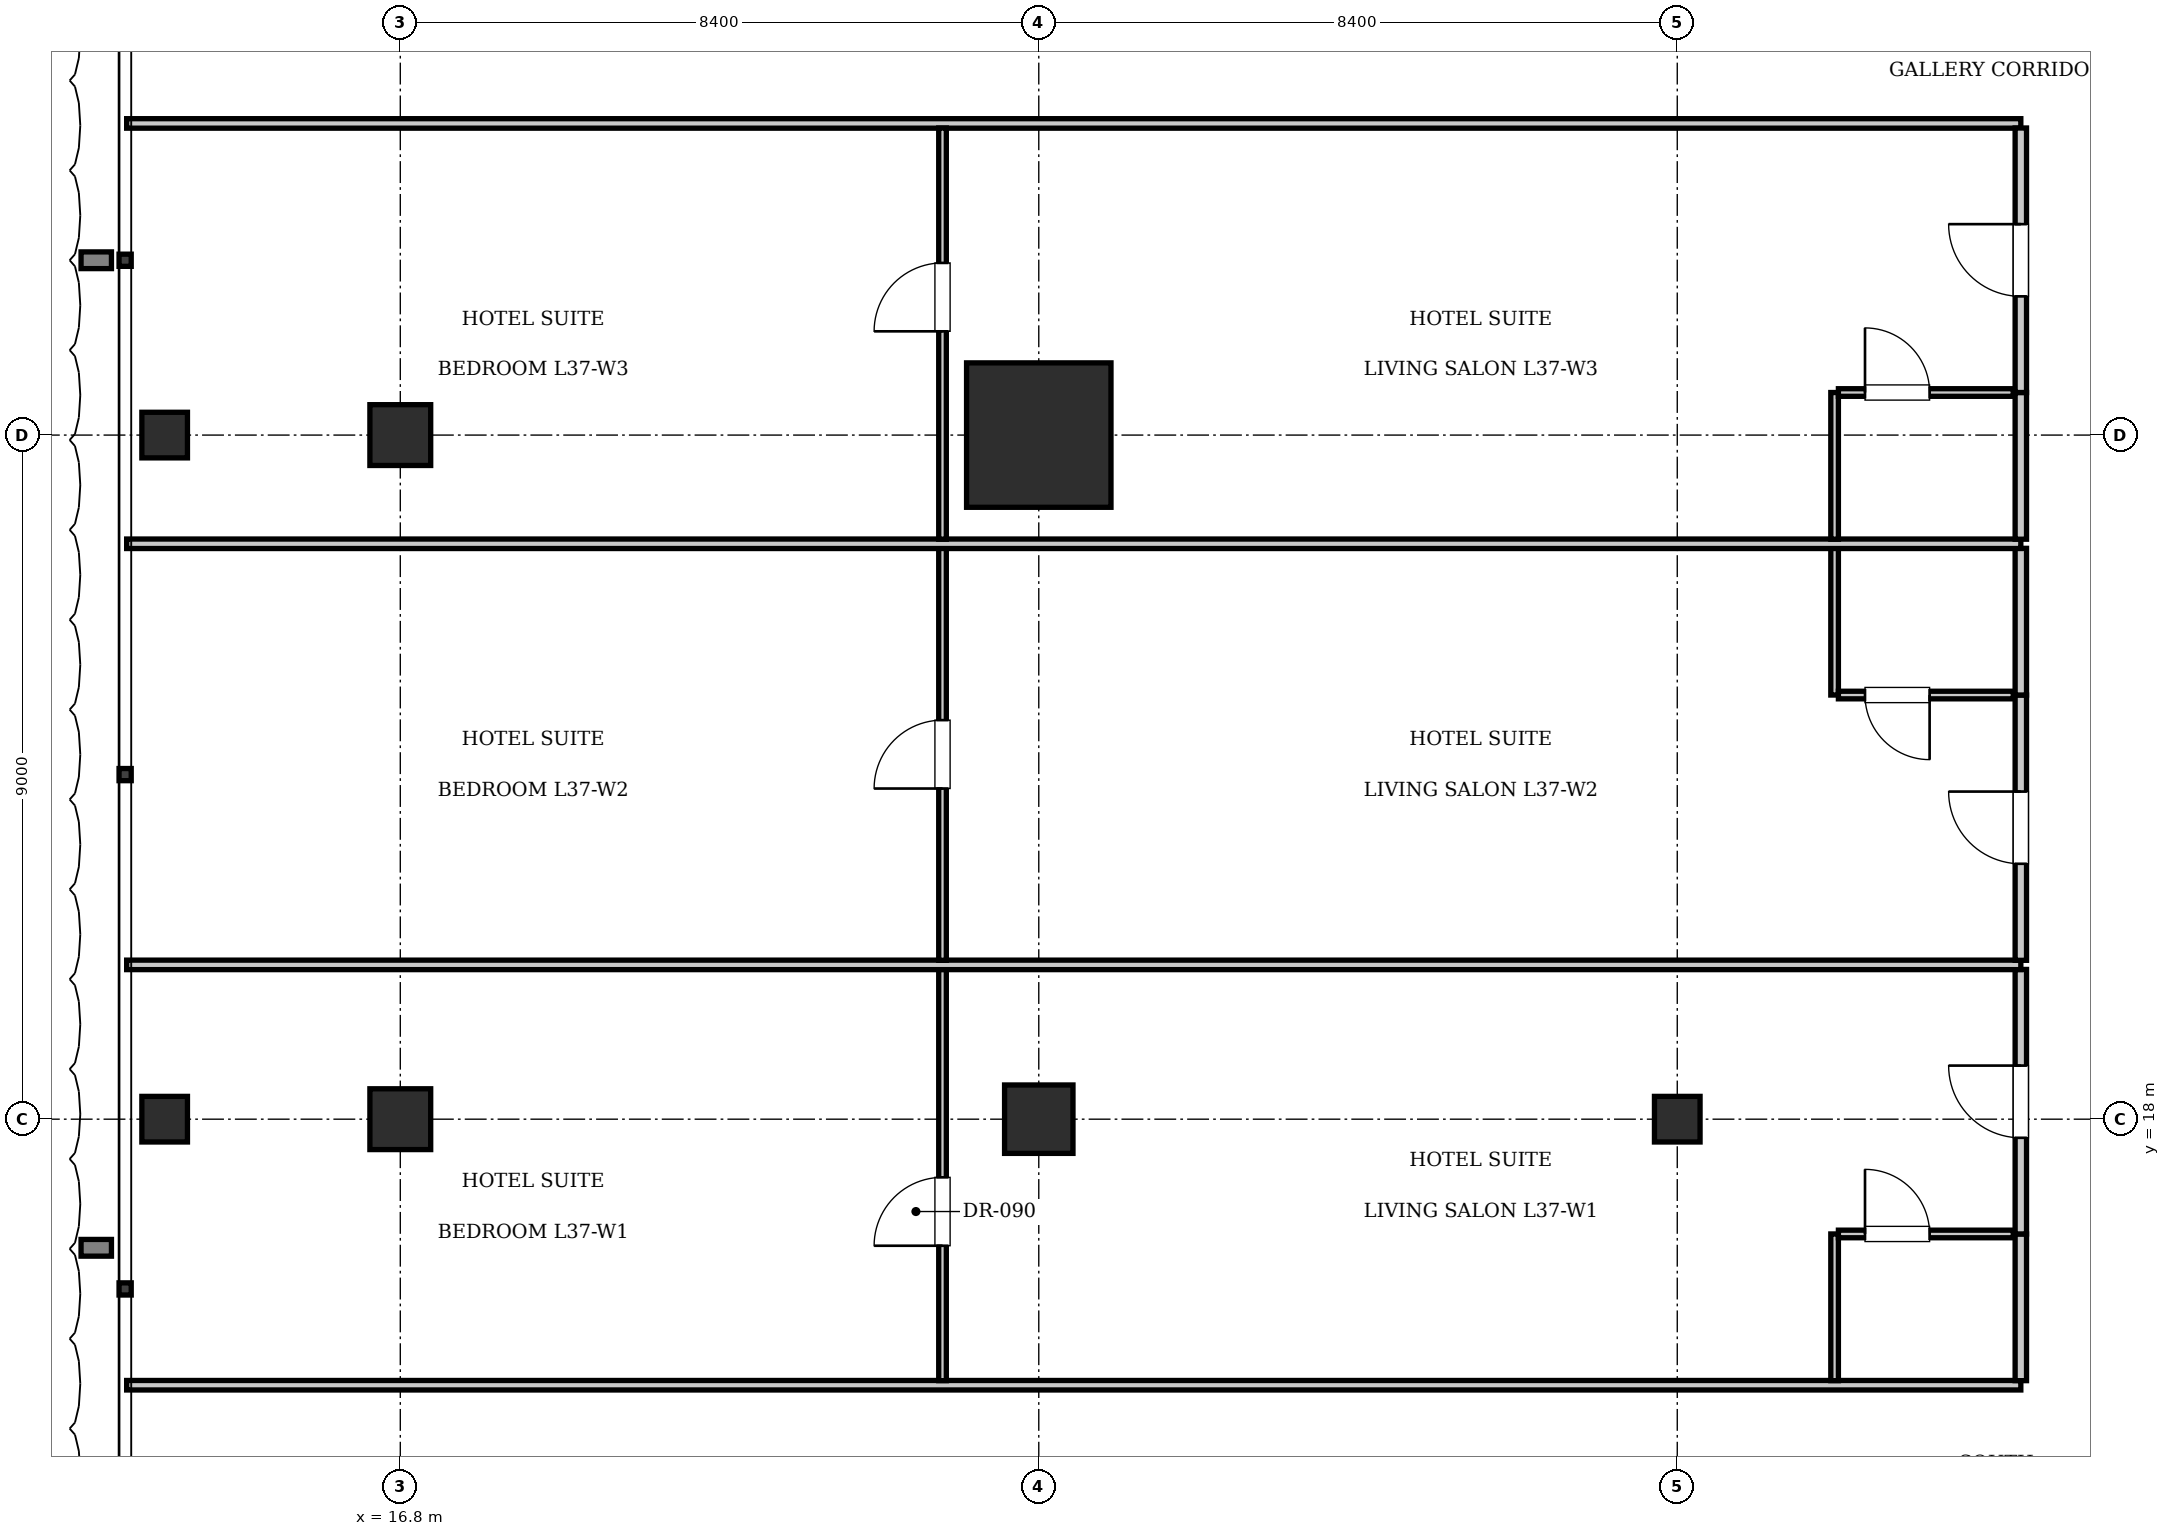
"""IFC4 building model, lengths in metres.
Left out: names, types, materials, properties, quantities, classifications, styles, units other than length and angle.
Written with IfcOpenShell. Run it as: python <this file> out.ifc"""

import sys

from ifc_helpers import new_model, si_unit, direction, frame, frame_2d, origin, origin_2d, place, context, subcontext, project, spatial, rectangle, i_section, extrude, element, fill, save


model = new_model("IFC4")
c1 = context("Model", 3, precision=1e-05, world=origin(), true_north=direction((0.0, 1.0)))
c2 = subcontext(c1, "Body", "Model", "MODEL_VIEW")
j1 = project(units=[si_unit("LENGTHUNIT", "METRE"), si_unit("PLANEANGLEUNIT", "RADIAN")], contexts=[c1])
p1 = place(None, origin())
s1 = spatial("IfcSite", under=j1, at=p1, CompositionType="ELEMENT")
p2 = place(p1, origin())
s2 = spatial("IfcBuilding", under=s1, at=p2, CompositionType="ELEMENT")
p3 = place(p2, frame((0.0, 0.0, 154.35)))
s3 = spatial("IfcBuildingStorey", under=s2, at=p3, CompositionType="ELEMENT", Elevation=154.35)
p4 = place(p3, frame((25.2, 27.0, 0.0), z_axis=(0.0, 0.0, 1.0), x_axis=(1.0, 0.0, 0.0)))
e1 = element("IfcColumn", 1, at=p4, inside=s3, PredefinedType="COLUMN", context=c2, shape_type="SweptSolid", body=[
    extrude(rectangle(XDim=1.9, YDim=1.9, at=origin_2d()), origin(), (0.0, 0.0, 1.0), 3.85),
])
p5 = place(p3, frame((25.2, 18.0, 0.0), z_axis=(0.0, 0.0, 1.0), x_axis=(1.0, 0.0, 0.0)))
e2 = element("IfcColumn", 2, at=p5, inside=s3, PredefinedType="COLUMN", context=c2, shape_type="SweptSolid", body=[
    extrude(rectangle(XDim=0.9, YDim=0.9, at=origin_2d()), origin(), (0.0, 0.0, 1.0), 3.85),
])
p6 = place(p3, frame((33.6, 18.0, 0.0), z_axis=(0.0, 0.0, 1.0), x_axis=(1.0, 0.0, 0.0)))
e3 = element("IfcColumn", 3, at=p6, inside=s3, PredefinedType="COLUMN", context=c2, shape_type="SweptSolid", body=[
    extrude(i_section(OverallWidth=0.6, OverallDepth=0.6, WebThickness=0.025, FlangeThickness=0.038, at=origin_2d()), origin(), (0.0, 0.0, 1.0), 3.85),
])
for number, where, z_axis, x_axis in (
    (4, (16.8, 18.0, 0.0), (0.0, 0.0, 1.0), (1.0, 0.0, 0.0)),
    (5, (16.8, 27.0, 0.0), (0.0, 0.0, 1.0), (1.0, 0.0, 0.0)),
):
    element("IfcColumn", number, at=place(p3, frame(where, z_axis=z_axis, x_axis=x_axis)), inside=s3, PredefinedType="COLUMN", context=c2, shape_type="SweptSolid", body=[
        extrude(rectangle(XDim=0.8, YDim=0.8, at=origin_2d()), origin(), (0.0, 0.0, 1.0), 3.85),
    ])
for number, where, z_axis, x_axis in (
    (6, (13.7, 18.0, 0.0), (0.0, 0.0, 1.0), (1.0, 0.0, 0.0)),
    (7, (13.7, 27.0, 0.0), (0.0, 0.0, 1.0), (1.0, 0.0, 0.0)),
):
    element("IfcColumn", number, at=place(p3, frame(where, z_axis=z_axis, x_axis=x_axis)), inside=s3, PredefinedType="COLUMN", context=c2, shape_type="SweptSolid", body=[
        extrude(i_section(OverallWidth=0.6, OverallDepth=0.6, WebThickness=0.025, FlangeThickness=0.038, at=origin_2d()), origin(), (0.0, 0.0, 1.0), 3.85),
    ])
for number, where, z_axis, x_axis in (
    (8, (13.2, 14.5, 0.0), (0.0, 0.0, 1.0), (1.0, 0.0, 0.0)),
    (9, (13.2, 31.1, 0.0), (0.0, 0.0, 1.0), (1.0, 0.0, 0.0)),
):
    element("IfcWall", number, at=place(p3, frame(where, z_axis=z_axis, x_axis=x_axis)), inside=s3, PredefinedType="PARTITIONING", context=c2, shape_type="SweptSolid", body=[
        extrude(rectangle(XDim=24.92, YDim=0.125, at=frame_2d((12.46, 0.0))), origin(), (0.0, 0.0, 1.0), 3.61),
    ])
p7 = place(p3, frame((38.12, 14.56, 0.0), z_axis=(0.0, 0.0, 1.0), x_axis=(0.0, 1.0, 0.0)))
e10 = element("IfcWall", 10, at=p7, inside=s3, PredefinedType="PARTITIONING", context=c2, shape_type="SweptSolid", body=[
    extrude(rectangle(XDim=1.93, YDim=0.15, at=frame_2d((0.965, 0.0))), origin(), (0.0, 0.0, 1.0), 3.61),
])
p8 = place(p3, frame((38.12, 16.49, 0.0), z_axis=(0.0, 0.0, 1.0), x_axis=(0.0, 1.0, 0.0)))
e11 = element("IfcWall", 11, at=p8, inside=s3, PredefinedType="PARTITIONING", context=c2, shape_type="SweptSolid", body=[
    extrude(rectangle(XDim=3.48, YDim=0.15, at=frame_2d((1.74, 0.0))), origin(), (0.0, 0.0, 1.0), 3.61),
])
p9 = place(p8, frame((1.265, 0.0, 0.0)))
e12 = element("IfcOpeningElement", 12, at=p9, cuts=e11, PredefinedType="OPENING", context=c2, shape_type="SweptSolid", body=[
    extrude(rectangle(XDim=0.95, YDim=2.15, at=frame_2d((0.475, 1.075))), frame((0.0, 0.085, 0.0), z_axis=(0.0, -1.0, 0.0), x_axis=(1.0, 0.0, 0.0)), (0.0, 0.0, 1.0), 0.17),
])
p10 = place(p3, frame((35.67, 14.56, 0.0), z_axis=(0.0, 0.0, 1.0), x_axis=(0.0, 1.0, 0.0)))
e13 = element("IfcWall", 13, at=p10, inside=s3, PredefinedType="PARTITIONING", context=c2, shape_type="SweptSolid", body=[
    extrude(rectangle(XDim=1.93, YDim=0.1, at=frame_2d((0.965, 0.0))), origin(), (0.0, 0.0, 1.0), 3.61),
])
p11 = place(p3, frame((35.72, 16.49, 0.0), z_axis=(0.0, 0.0, 1.0), x_axis=(1.0, 0.0, 0.0)))
e14 = element("IfcWall", 14, at=p11, inside=s3, PredefinedType="PARTITIONING", context=c2, shape_type="SweptSolid", body=[
    extrude(rectangle(XDim=2.3, YDim=0.1, at=frame_2d((1.15, 0.0))), origin(), (0.0, 0.0, 1.0), 3.61),
])
p12 = place(p11, frame((0.35, 0.0, 0.0)))
e15 = element("IfcOpeningElement", 15, at=p12, cuts=e14, PredefinedType="OPENING", context=c2, shape_type="SweptSolid", body=[
    extrude(rectangle(XDim=0.85, YDim=2.1, at=frame_2d((0.425, 1.05))), frame((0.0, 0.06, 0.0), z_axis=(0.0, -1.0, 0.0), x_axis=(1.0, 0.0, 0.0)), (0.0, 0.0, 1.0), 0.12),
])
p13 = place(p3, frame((23.934, 14.56, 0.0), z_axis=(0.0, 0.0, 1.0), x_axis=(0.0, 1.0, 0.0)))
e16 = element("IfcWall", 16, at=p13, inside=s3, PredefinedType="PARTITIONING", context=c2, shape_type="SweptSolid", body=[
    extrude(rectangle(XDim=5.41, YDim=0.1, at=frame_2d((2.705, 0.0))), origin(), (0.0, 0.0, 1.0), 3.61),
])
p14 = place(p13, frame((1.775, 0.0, 0.0)))
e17 = element("IfcOpeningElement", 17, at=p14, cuts=e16, PredefinedType="OPENING", context=c2, shape_type="SweptSolid", body=[
    extrude(rectangle(XDim=0.9, YDim=2.1, at=frame_2d((0.45, 1.05))), frame((0.0, 0.06, 0.0), z_axis=(0.0, -1.0, 0.0), x_axis=(1.0, 0.0, 0.0)), (0.0, 0.0, 1.0), 0.12),
])
p15 = place(p3, frame((13.2, 20.03, 0.0), z_axis=(0.0, 0.0, 1.0), x_axis=(1.0, 0.0, 0.0)))
e18 = element("IfcWall", 18, at=p15, inside=s3, PredefinedType="PARTITIONING", context=c2, shape_type="SweptSolid", body=[
    extrude(rectangle(XDim=24.92, YDim=0.125, at=frame_2d((12.46, 0.0))), origin(), (0.0, 0.0, 1.0), 3.61),
])
p16 = place(p3, frame((38.12, 20.09, 0.0), z_axis=(0.0, 0.0, 1.0), x_axis=(0.0, 1.0, 0.0)))
e19 = element("IfcWall", 19, at=p16, inside=s3, PredefinedType="PARTITIONING", context=c2, shape_type="SweptSolid", body=[
    extrude(rectangle(XDim=3.49, YDim=0.15, at=frame_2d((1.745, 0.0))), origin(), (0.0, 0.0, 1.0), 3.61),
])
p17 = place(p16, frame((1.27, 0.0, 0.0)))
e20 = element("IfcOpeningElement", 20, at=p17, cuts=e19, PredefinedType="OPENING", context=c2, shape_type="SweptSolid", body=[
    extrude(rectangle(XDim=0.95, YDim=2.15, at=frame_2d((0.475, 1.075))), frame((0.0, 0.085, 0.0), z_axis=(0.0, -1.0, 0.0), x_axis=(1.0, 0.0, 0.0)), (0.0, 0.0, 1.0), 0.17),
])
p18 = place(p3, frame((38.12, 23.58, 0.0), z_axis=(0.0, 0.0, 1.0), x_axis=(0.0, 1.0, 0.0)))
e21 = element("IfcWall", 21, at=p18, inside=s3, PredefinedType="PARTITIONING", context=c2, shape_type="SweptSolid", body=[
    extrude(rectangle(XDim=1.93, YDim=0.15, at=frame_2d((0.965, 0.0))), origin(), (0.0, 0.0, 1.0), 3.61),
])
p19 = place(p3, frame((35.67, 23.58, 0.0), z_axis=(0.0, 0.0, 1.0), x_axis=(0.0, 1.0, 0.0)))
e22 = element("IfcWall", 22, at=p19, inside=s3, PredefinedType="PARTITIONING", context=c2, shape_type="SweptSolid", body=[
    extrude(rectangle(XDim=1.93, YDim=0.1, at=frame_2d((0.965, 0.0))), origin(), (0.0, 0.0, 1.0), 3.61),
])
p20 = place(p3, frame((35.72, 23.58, 0.0), z_axis=(0.0, 0.0, 1.0), x_axis=(1.0, 0.0, 0.0)))
e23 = element("IfcWall", 23, at=p20, inside=s3, PredefinedType="PARTITIONING", context=c2, shape_type="SweptSolid", body=[
    extrude(rectangle(XDim=2.3, YDim=0.1, at=frame_2d((1.15, 0.0))), origin(), (0.0, 0.0, 1.0), 3.61),
])
p21 = place(p20, frame((0.35, 0.0, 0.0)))
e24 = element("IfcOpeningElement", 24, at=p21, cuts=e23, PredefinedType="OPENING", context=c2, shape_type="SweptSolid", body=[
    extrude(rectangle(XDim=0.85, YDim=2.1, at=frame_2d((0.425, 1.05))), frame((0.0, 0.06, 0.0), z_axis=(0.0, -1.0, 0.0), x_axis=(1.0, 0.0, 0.0)), (0.0, 0.0, 1.0), 0.12),
])
p22 = place(p3, frame((23.934, 20.09, 0.0), z_axis=(0.0, 0.0, 1.0), x_axis=(0.0, 1.0, 0.0)))
e25 = element("IfcWall", 25, at=p22, inside=s3, PredefinedType="PARTITIONING", context=c2, shape_type="SweptSolid", body=[
    extrude(rectangle(XDim=5.42, YDim=0.1, at=frame_2d((2.71, 0.0))), origin(), (0.0, 0.0, 1.0), 3.61),
])
p23 = place(p22, frame((2.26, 0.0, 0.0)))
e26 = element("IfcOpeningElement", 26, at=p23, cuts=e25, PredefinedType="OPENING", context=c2, shape_type="SweptSolid", body=[
    extrude(rectangle(XDim=0.9, YDim=2.1, at=frame_2d((0.45, 1.05))), frame((0.0, 0.06, 0.0), z_axis=(0.0, -1.0, 0.0), x_axis=(1.0, 0.0, 0.0)), (0.0, 0.0, 1.0), 0.12),
])
p24 = place(p3, frame((13.2, 25.57, 0.0), z_axis=(0.0, 0.0, 1.0), x_axis=(1.0, 0.0, 0.0)))
e27 = element("IfcWall", 27, at=p24, inside=s3, PredefinedType="PARTITIONING", context=c2, shape_type="SweptSolid", body=[
    extrude(rectangle(XDim=24.92, YDim=0.125, at=frame_2d((12.46, 0.0))), origin(), (0.0, 0.0, 1.0), 3.61),
])
p25 = place(p3, frame((38.12, 25.63, 0.0), z_axis=(0.0, 0.0, 1.0), x_axis=(0.0, 1.0, 0.0)))
e28 = element("IfcWall", 28, at=p25, inside=s3, PredefinedType="PARTITIONING", context=c2, shape_type="SweptSolid", body=[
    extrude(rectangle(XDim=1.93, YDim=0.15, at=frame_2d((0.965, 0.0))), origin(), (0.0, 0.0, 1.0), 3.61),
])
p26 = place(p3, frame((38.12, 27.56, 0.0), z_axis=(0.0, 0.0, 1.0), x_axis=(0.0, 1.0, 0.0)))
e29 = element("IfcWall", 29, at=p26, inside=s3, PredefinedType="PARTITIONING", context=c2, shape_type="SweptSolid", body=[
    extrude(rectangle(XDim=3.48, YDim=0.15, at=frame_2d((1.74, 0.0))), origin(), (0.0, 0.0, 1.0), 3.61),
])
p27 = place(p26, frame((1.265, 0.0, 0.0)))
e30 = element("IfcOpeningElement", 30, at=p27, cuts=e29, PredefinedType="OPENING", context=c2, shape_type="SweptSolid", body=[
    extrude(rectangle(XDim=0.95, YDim=2.15, at=frame_2d((0.475, 1.075))), frame((0.0, 0.085, 0.0), z_axis=(0.0, -1.0, 0.0), x_axis=(1.0, 0.0, 0.0)), (0.0, 0.0, 1.0), 0.17),
])
p28 = place(p3, frame((35.67, 25.63, 0.0), z_axis=(0.0, 0.0, 1.0), x_axis=(0.0, 1.0, 0.0)))
e31 = element("IfcWall", 31, at=p28, inside=s3, PredefinedType="PARTITIONING", context=c2, shape_type="SweptSolid", body=[
    extrude(rectangle(XDim=1.93, YDim=0.1, at=frame_2d((0.965, 0.0))), origin(), (0.0, 0.0, 1.0), 3.61),
])
p29 = place(p3, frame((35.72, 27.56, 0.0), z_axis=(0.0, 0.0, 1.0), x_axis=(1.0, 0.0, 0.0)))
e32 = element("IfcWall", 32, at=p29, inside=s3, PredefinedType="PARTITIONING", context=c2, shape_type="SweptSolid", body=[
    extrude(rectangle(XDim=2.3, YDim=0.1, at=frame_2d((1.15, 0.0))), origin(), (0.0, 0.0, 1.0), 3.61),
])
p30 = place(p29, frame((0.35, 0.0, 0.0)))
e33 = element("IfcOpeningElement", 33, at=p30, cuts=e32, PredefinedType="OPENING", context=c2, shape_type="SweptSolid", body=[
    extrude(rectangle(XDim=0.85, YDim=2.1, at=frame_2d((0.425, 1.05))), frame((0.0, 0.06, 0.0), z_axis=(0.0, -1.0, 0.0), x_axis=(1.0, 0.0, 0.0)), (0.0, 0.0, 1.0), 0.12),
])
p31 = place(p3, frame((23.934, 25.63, 0.0), z_axis=(0.0, 0.0, 1.0), x_axis=(0.0, 1.0, 0.0)))
e34 = element("IfcWall", 34, at=p31, inside=s3, PredefinedType="PARTITIONING", context=c2, shape_type="SweptSolid", body=[
    extrude(rectangle(XDim=5.41, YDim=0.1, at=frame_2d((2.705, 0.0))), origin(), (0.0, 0.0, 1.0), 3.61),
])
p32 = place(p31, frame((2.735, 0.0, 0.0)))
e35 = element("IfcOpeningElement", 35, at=p32, cuts=e34, PredefinedType="OPENING", context=c2, shape_type="SweptSolid", body=[
    extrude(rectangle(XDim=0.9, YDim=2.1, at=frame_2d((0.45, 1.05))), frame((0.0, 0.06, 0.0), z_axis=(0.0, -1.0, 0.0), x_axis=(1.0, 0.0, 0.0)), (0.0, 0.0, 1.0), 0.12),
])
p33 = place(p12, origin())
e36 = element("IfcDoor", 36, at=p33, inside=s3, OperationType="SINGLE_SWING_LEFT", PredefinedType="DOOR", context=c2, shape_type="SweptSolid", body=[
    extrude(rectangle(XDim=0.85, YDim=2.1, at=frame_2d((0.425, 1.05))), frame((0.0, 0.025, 0.0), z_axis=(0.0, -1.0, 0.0), x_axis=(1.0, 0.0, 0.0)), (0.0, 0.0, 1.0), 0.05),
])
fill(e15, e36)
p34 = place(p9, origin())
e37 = element("IfcDoor", 37, at=p34, inside=s3, OperationType="SINGLE_SWING_RIGHT", PredefinedType="DOOR", context=c2, shape_type="SweptSolid", body=[
    extrude(rectangle(XDim=0.95, YDim=2.15, at=frame_2d((0.475, 1.075))), frame((0.0, 0.025, 0.0), z_axis=(0.0, -1.0, 0.0), x_axis=(1.0, 0.0, 0.0)), (0.0, 0.0, 1.0), 0.05),
])
fill(e12, e37)
p35 = place(p14, origin())
e38 = element("IfcDoor", 38, at=p35, inside=s3, OperationType="SINGLE_SWING_LEFT", PredefinedType="DOOR", context=c2, shape_type="SweptSolid", body=[
    extrude(rectangle(XDim=0.9, YDim=2.1, at=frame_2d((0.45, 1.05))), frame((0.0, 0.025, 0.0), z_axis=(0.0, -1.0, 0.0), x_axis=(1.0, 0.0, 0.0)), (0.0, 0.0, 1.0), 0.05),
])
fill(e17, e38)
p36 = place(p21, frame((0.85, 0.0, 0.0), z_axis=(0.0, 0.0, 1.0), x_axis=(-1.0, 0.0, 0.0)))
e39 = element("IfcDoor", 39, at=p36, inside=s3, OperationType="SINGLE_SWING_LEFT", PredefinedType="DOOR", context=c2, shape_type="SweptSolid", body=[
    extrude(rectangle(XDim=0.85, YDim=2.1, at=frame_2d((0.425, 1.05))), frame((0.0, 0.025, 0.0), z_axis=(0.0, -1.0, 0.0), x_axis=(1.0, 0.0, 0.0)), (0.0, 0.0, 1.0), 0.05),
])
fill(e24, e39)
p37 = place(p17, origin())
e40 = element("IfcDoor", 40, at=p37, inside=s3, OperationType="SINGLE_SWING_RIGHT", PredefinedType="DOOR", context=c2, shape_type="SweptSolid", body=[
    extrude(rectangle(XDim=0.95, YDim=2.15, at=frame_2d((0.475, 1.075))), frame((0.0, 0.025, 0.0), z_axis=(0.0, -1.0, 0.0), x_axis=(1.0, 0.0, 0.0)), (0.0, 0.0, 1.0), 0.05),
])
fill(e20, e40)
p38 = place(p23, origin())
e41 = element("IfcDoor", 41, at=p38, inside=s3, OperationType="SINGLE_SWING_LEFT", PredefinedType="DOOR", context=c2, shape_type="SweptSolid", body=[
    extrude(rectangle(XDim=0.9, YDim=2.1, at=frame_2d((0.45, 1.05))), frame((0.0, 0.025, 0.0), z_axis=(0.0, -1.0, 0.0), x_axis=(1.0, 0.0, 0.0)), (0.0, 0.0, 1.0), 0.05),
])
fill(e26, e41)
p39 = place(p30, origin())
e42 = element("IfcDoor", 42, at=p39, inside=s3, OperationType="SINGLE_SWING_LEFT", PredefinedType="DOOR", context=c2, shape_type="SweptSolid", body=[
    extrude(rectangle(XDim=0.85, YDim=2.1, at=frame_2d((0.425, 1.05))), frame((0.0, 0.025, 0.0), z_axis=(0.0, -1.0, 0.0), x_axis=(1.0, 0.0, 0.0)), (0.0, 0.0, 1.0), 0.05),
])
fill(e33, e42)
p40 = place(p27, origin())
e43 = element("IfcDoor", 43, at=p40, inside=s3, OperationType="SINGLE_SWING_RIGHT", PredefinedType="DOOR", context=c2, shape_type="SweptSolid", body=[
    extrude(rectangle(XDim=0.95, YDim=2.15, at=frame_2d((0.475, 1.075))), frame((0.0, 0.025, 0.0), z_axis=(0.0, -1.0, 0.0), x_axis=(1.0, 0.0, 0.0)), (0.0, 0.0, 1.0), 0.05),
])
fill(e30, e43)
p41 = place(p32, origin())
e44 = element("IfcDoor", 44, at=p41, inside=s3, OperationType="SINGLE_SWING_LEFT", PredefinedType="DOOR", context=c2, shape_type="SweptSolid", body=[
    extrude(rectangle(XDim=0.9, YDim=2.1, at=frame_2d((0.45, 1.05))), frame((0.0, 0.025, 0.0), z_axis=(0.0, -1.0, 0.0), x_axis=(1.0, 0.0, 0.0)), (0.0, 0.0, 1.0), 0.05),
])
fill(e35, e44)
save(model, sys.argv[1])
